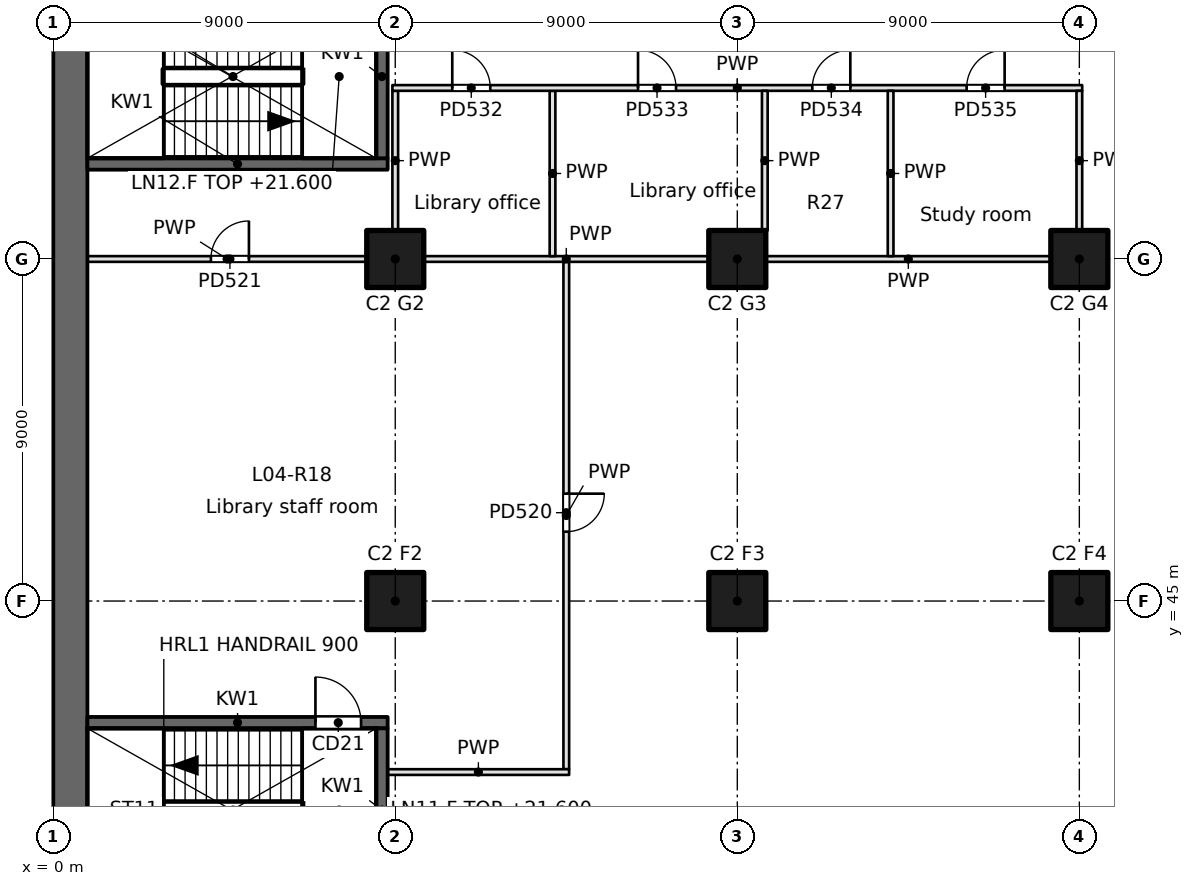
"""IFC4 building model, lengths in metres.
Left out: names, types, materials, properties, quantities, classifications, styles, units other than length and angle.
Written with IfcOpenShell. Run it as: python <this file> out.ifc"""

import sys

from ifc_helpers import new_model, si_unit, direction, frame, frame_2d, origin, origin_2d, place, context, subcontext, project, spatial, rectangle, extrude, element, fill, save


model = new_model("IFC4")
c1 = context("Model", 3, precision=1e-05, world=origin(), true_north=direction((0.0, 1.0)))
c2 = subcontext(c1, "Body", "Model", "MODEL_VIEW")
j1 = project(units=[si_unit("LENGTHUNIT", "METRE"), si_unit("PLANEANGLEUNIT", "RADIAN")], contexts=[c1])
p1 = place(None, origin())
s1 = spatial("IfcSite", under=j1, at=p1, CompositionType="ELEMENT")
p2 = place(p1, origin())
s2 = spatial("IfcBuilding", under=s1, at=p2, CompositionType="ELEMENT")
p3 = place(p2, frame((0.0, 0.0, 21.6)))
s3 = spatial("IfcBuildingStorey", under=s2, at=p3, CompositionType="ELEMENT", Elevation=21.6)
for number, where, z_axis, x_axis in (
    (1, (9.0, 45.0, 0.0), (0.0, 0.0, 1.0), (1.0, 0.0, 0.0)),
    (2, (9.0, 54.0, 0.0), (0.0, 0.0, 1.0), (1.0, 0.0, 0.0)),
    (3, (18.0, 45.0, 0.0), (0.0, 0.0, 1.0), (1.0, 0.0, 0.0)),
    (4, (18.0, 54.0, 0.0), (0.0, 0.0, 1.0), (1.0, 0.0, 0.0)),
    (5, (27.0, 45.0, 0.0), (0.0, 0.0, 1.0), (1.0, 0.0, 0.0)),
    (6, (27.0, 54.0, 0.0), (0.0, 0.0, 1.0), (1.0, 0.0, 0.0)),
):
    element("IfcColumn", number, at=place(p3, frame(where, z_axis=z_axis, x_axis=x_axis)), inside=s3, PredefinedType="COLUMN", context=c2, shape_type="SweptSolid", body=[
        extrude(rectangle(XDim=1.5, YDim=1.5, at=origin_2d()), origin(), (0.0, 0.0, 1.0), 4.8),
    ])
p4 = place(p3, frame((0.45, 94.5, 0.0), z_axis=(0.0, 0.0, 1.0), x_axis=(0.0, -1.0, 0.0)))
e7 = element("IfcWall", 7, at=p4, inside=s3, PredefinedType="SHEAR", context=c2, shape_type="SweptSolid", body=[
    extrude(rectangle(XDim=66.085, YDim=0.9, at=frame_2d((33.042, 0.0))), origin(), (0.0, 0.0, 1.0), 4.8),
])
p5 = place(p3, frame((0.9, 41.8, -0.35), z_axis=(0.0, 0.0, 1.0), x_axis=(1.0, 0.0, 0.0)))
e8 = element("IfcWall", 8, at=p5, inside=s3, PredefinedType="SOLIDWALL", context=c2, shape_type="SweptSolid", body=[
    extrude(rectangle(XDim=7.9, YDim=0.3, at=frame_2d((3.95, 0.0))), origin(), (0.0, 0.0, 1.0), 4.8),
])
p6 = place(p5, frame((6.0, 0.0, 0.35)))
e9 = element("IfcOpeningElement", 9, at=p6, cuts=e8, PredefinedType="OPENING", context=c2, shape_type="SweptSolid", body=[
    extrude(rectangle(XDim=1.2, YDim=2.1, at=frame_2d((0.6, 1.05))), frame((0.0, 0.15, 0.0), z_axis=(0.0, -1.0, 0.0), x_axis=(1.0, 0.0, 0.0)), (0.0, 0.0, 1.0), 0.3),
])
p7 = place(p3, frame((0.9, 56.5, -0.35), z_axis=(0.0, 0.0, 1.0), x_axis=(1.0, 0.0, 0.0)))
e10 = element("IfcWall", 10, at=p7, inside=s3, PredefinedType="SOLIDWALL", context=c2, shape_type="SweptSolid", body=[
    extrude(rectangle(XDim=7.9, YDim=0.3, at=frame_2d((3.95, 0.0))), origin(), (0.0, 0.0, 1.0), 4.8),
])
p8 = place(p3, frame((8.65, 37.35, -0.35), z_axis=(0.0, 0.0, 1.0), x_axis=(0.0, 1.0, 0.0)))
e11 = element("IfcWall", 11, at=p8, inside=s3, PredefinedType="SOLIDWALL", context=c2, shape_type="SweptSolid", body=[
    extrude(rectangle(XDim=4.3, YDim=0.3, at=frame_2d((2.15, 0.0))), origin(), (0.0, 0.0, 1.0), 4.8),
])
p9 = place(p3, frame((8.65, 56.65, -0.35), z_axis=(0.0, 0.0, 1.0), x_axis=(0.0, 1.0, 0.0)))
e12 = element("IfcWall", 12, at=p9, inside=s3, PredefinedType="SOLIDWALL", context=c2, shape_type="SweptSolid", body=[
    extrude(rectangle(XDim=4.3, YDim=0.3, at=frame_2d((2.15, 0.0))), origin(), (0.0, 0.0, 1.0), 4.8),
])
p10 = place(p3, frame((0.9, 54.0, 0.0), z_axis=(0.0, 0.0, 1.0), x_axis=(1.0, 0.0, 0.0)))
e13 = element("IfcWall", 13, at=p10, inside=s3, PredefinedType="PARTITIONING", context=c2, shape_type="SweptSolid", body=[
    extrude(rectangle(XDim=7.35, YDim=0.15, at=frame_2d((3.675, 0.0))), origin(), (0.0, 0.0, 1.0), 4.45),
])
p11 = place(p10, frame((3.25, 0.0, 0.0)))
e14 = element("IfcOpeningElement", 14, at=p11, cuts=e13, PredefinedType="OPENING", context=c2, shape_type="SweptSolid", body=[
    extrude(rectangle(XDim=1.0, YDim=2.1, at=frame_2d((0.5, 1.05))), frame((0.0, 0.075, 0.0), z_axis=(0.0, -1.0, 0.0), x_axis=(1.0, 0.0, 0.0)), (0.0, 0.0, 1.0), 0.15),
])
for number, where, z_axis, x_axis in (
    (15, (9.75, 54.0, 0.0), (0.0, 0.0, 1.0), (1.0, 0.0, 0.0)),
    (16, (26.25, 54.0, 0.0), (0.0, 0.0, 1.0), (-1.0, 0.0, 0.0)),
):
    element("IfcWall", number, at=place(p3, frame(where, z_axis=z_axis, x_axis=x_axis)), inside=s3, PredefinedType="PARTITIONING", context=c2, shape_type="SweptSolid", body=[
        extrude(rectangle(XDim=7.5, YDim=0.15, at=frame_2d((3.75, 0.0))), origin(), (0.0, 0.0, 1.0), 4.45),
    ])
p12 = place(p3, frame((13.5, 53.925, 0.0), z_axis=(0.0, 0.0, 1.0), x_axis=(0.0, -1.0, 0.0)))
e17 = element("IfcWall", 17, at=p12, inside=s3, PredefinedType="PARTITIONING", context=c2, shape_type="SweptSolid", body=[
    extrude(rectangle(XDim=13.35, YDim=0.15, at=frame_2d((6.675, 0.0))), origin(), (0.0, 0.0, 1.0), 4.45),
])
p13 = place(p12, frame((6.1, 0.0, 0.0)))
e18 = element("IfcOpeningElement", 18, at=p13, cuts=e17, PredefinedType="OPENING", context=c2, shape_type="SweptSolid", body=[
    extrude(rectangle(XDim=1.0, YDim=2.1, at=frame_2d((0.5, 1.05))), frame((0.0, 0.075, 0.0), z_axis=(0.0, -1.0, 0.0), x_axis=(1.0, 0.0, 0.0)), (0.0, 0.0, 1.0), 0.15),
])
p14 = place(p3, frame((13.575, 40.5, 0.0), z_axis=(0.0, 0.0, 1.0), x_axis=(-1.0, 0.0, 0.0)))
e19 = element("IfcWall", 19, at=p14, inside=s3, PredefinedType="PARTITIONING", context=c2, shape_type="SweptSolid", body=[
    extrude(rectangle(XDim=4.775, YDim=0.15, at=frame_2d((2.387, 0.0))), origin(), (0.0, 0.0, 1.0), 4.45),
])
p15 = place(p3, frame((13.138, 54.075, 0.0), z_axis=(0.0, 0.0, 1.0), x_axis=(0.0, 1.0, 0.0)))
e20 = element("IfcWall", 20, at=p15, inside=s3, PredefinedType="PARTITIONING", context=c2, shape_type="SweptSolid", body=[
    extrude(rectangle(XDim=4.35, YDim=0.15, at=frame_2d((2.175, 0.0))), origin(), (0.0, 0.0, 1.0), 4.45),
])
p16 = place(p3, frame((9.0, 54.75, 0.0), z_axis=(0.0, 0.0, 1.0), x_axis=(0.0, 1.0, 0.0)))
e21 = element("IfcWall", 21, at=p16, inside=s3, PredefinedType="PARTITIONING", context=c2, shape_type="SweptSolid", body=[
    extrude(rectangle(XDim=3.675, YDim=0.15, at=frame_2d((1.837, 0.0))), origin(), (0.0, 0.0, 1.0), 4.45),
])
p17 = place(p3, frame((8.925, 58.5, 0.0), z_axis=(0.0, 0.0, 1.0), x_axis=(1.0, 0.0, 0.0)))
e22 = element("IfcWall", 22, at=p17, inside=s3, PredefinedType="PARTITIONING", context=c2, shape_type="SweptSolid", body=[
    extrude(rectangle(XDim=18.15, YDim=0.15, at=frame_2d((9.075, 0.0))), origin(), (0.0, 0.0, 1.0), 4.45),
])
p18 = place(p17, frame((1.575, 0.0, 0.0)))
e23 = element("IfcOpeningElement", 23, at=p18, cuts=e22, PredefinedType="OPENING", context=c2, shape_type="SweptSolid", body=[
    extrude(rectangle(XDim=1.0, YDim=2.1, at=frame_2d((0.5, 1.05))), frame((0.0, 0.075, 0.0), z_axis=(0.0, -1.0, 0.0), x_axis=(1.0, 0.0, 0.0)), (0.0, 0.0, 1.0), 0.15),
])
p19 = place(p17, frame((6.463, 0.0, 0.0)))
e24 = element("IfcOpeningElement", 24, at=p19, cuts=e22, PredefinedType="OPENING", context=c2, shape_type="SweptSolid", body=[
    extrude(rectangle(XDim=1.0, YDim=2.1, at=frame_2d((0.5, 1.05))), frame((0.0, 0.075, 0.0), z_axis=(0.0, -1.0, 0.0), x_axis=(1.0, 0.0, 0.0)), (0.0, 0.0, 1.0), 0.15),
])
p20 = place(p17, frame((11.049, 0.0, 0.0)))
e25 = element("IfcOpeningElement", 25, at=p20, cuts=e22, PredefinedType="OPENING", context=c2, shape_type="SweptSolid", body=[
    extrude(rectangle(XDim=1.0, YDim=2.1, at=frame_2d((0.5, 1.05))), frame((0.0, 0.075, 0.0), z_axis=(0.0, -1.0, 0.0), x_axis=(1.0, 0.0, 0.0)), (0.0, 0.0, 1.0), 0.15),
])
p21 = place(p17, frame((15.109, 0.0, 0.0)))
e26 = element("IfcOpeningElement", 26, at=p21, cuts=e22, PredefinedType="OPENING", context=c2, shape_type="SweptSolid", body=[
    extrude(rectangle(XDim=1.0, YDim=2.1, at=frame_2d((0.5, 1.05))), frame((0.0, 0.075, 0.0), z_axis=(0.0, -1.0, 0.0), x_axis=(1.0, 0.0, 0.0)), (0.0, 0.0, 1.0), 0.15),
])
p22 = place(p3, frame((18.724, 54.75, 0.0), z_axis=(0.0, 0.0, 1.0), x_axis=(0.0, 1.0, 0.0)))
e27 = element("IfcWall", 27, at=p22, inside=s3, PredefinedType="PARTITIONING", context=c2, shape_type="SweptSolid", body=[
    extrude(rectangle(XDim=3.675, YDim=0.15, at=frame_2d((1.837, 0.0))), origin(), (0.0, 0.0, 1.0), 4.45),
])
p23 = place(p3, frame((22.034, 54.075, 0.0), z_axis=(0.0, 0.0, 1.0), x_axis=(0.0, 1.0, 0.0)))
e28 = element("IfcWall", 28, at=p23, inside=s3, PredefinedType="PARTITIONING", context=c2, shape_type="SweptSolid", body=[
    extrude(rectangle(XDim=4.35, YDim=0.15, at=frame_2d((2.175, 0.0))), origin(), (0.0, 0.0, 1.0), 4.45),
])
p24 = place(p3, frame((27.0, 58.425, 0.0), z_axis=(0.0, 0.0, 1.0), x_axis=(0.0, -1.0, 0.0)))
e29 = element("IfcWall", 29, at=p24, inside=s3, PredefinedType="PARTITIONING", context=c2, shape_type="SweptSolid", body=[
    extrude(rectangle(XDim=3.675, YDim=0.15, at=frame_2d((1.837, 0.0))), origin(), (0.0, 0.0, 1.0), 4.45),
])
p25 = place(p6, origin())
e30 = element("IfcDoor", 30, at=p25, inside=s3, OperationType="SINGLE_SWING_LEFT", PredefinedType="DOOR", context=c2, shape_type="SweptSolid", body=[
    extrude(rectangle(XDim=1.2, YDim=2.1, at=frame_2d((0.6, 1.05))), frame((0.0, 0.025, 0.0), z_axis=(0.0, -1.0, 0.0), x_axis=(1.0, 0.0, 0.0)), (0.0, 0.0, 1.0), 0.05),
])
fill(e9, e30)
p26 = place(p13, origin())
e31 = element("IfcDoor", 31, at=p26, inside=s3, OperationType="SINGLE_SWING_LEFT", PredefinedType="DOOR", context=c2, shape_type="SweptSolid", body=[
    extrude(rectangle(XDim=1.0, YDim=2.1, at=frame_2d((0.5, 1.05))), frame((0.0, 0.025, 0.0), z_axis=(0.0, -1.0, 0.0), x_axis=(1.0, 0.0, 0.0)), (0.0, 0.0, 1.0), 0.05),
])
fill(e18, e31)
p27 = place(p11, origin())
e32 = element("IfcDoor", 32, at=p27, inside=s3, OperationType="SINGLE_SWING_RIGHT", PredefinedType="DOOR", context=c2, shape_type="SweptSolid", body=[
    extrude(rectangle(XDim=1.0, YDim=2.1, at=frame_2d((0.5, 1.05))), frame((0.0, 0.025, 0.0), z_axis=(0.0, -1.0, 0.0), x_axis=(1.0, 0.0, 0.0)), (0.0, 0.0, 1.0), 0.05),
])
fill(e14, e32)
p28 = place(p18, origin())
e33 = element("IfcDoor", 33, at=p28, inside=s3, OperationType="SINGLE_SWING_LEFT", PredefinedType="DOOR", context=c2, shape_type="SweptSolid", body=[
    extrude(rectangle(XDim=1.0, YDim=2.1, at=frame_2d((0.5, 1.05))), frame((0.0, 0.025, 0.0), z_axis=(0.0, -1.0, 0.0), x_axis=(1.0, 0.0, 0.0)), (0.0, 0.0, 1.0), 0.05),
])
fill(e23, e33)
p29 = place(p19, origin())
e34 = element("IfcDoor", 34, at=p29, inside=s3, OperationType="SINGLE_SWING_LEFT", PredefinedType="DOOR", context=c2, shape_type="SweptSolid", body=[
    extrude(rectangle(XDim=1.0, YDim=2.1, at=frame_2d((0.5, 1.05))), frame((0.0, 0.025, 0.0), z_axis=(0.0, -1.0, 0.0), x_axis=(1.0, 0.0, 0.0)), (0.0, 0.0, 1.0), 0.05),
])
fill(e24, e34)
p30 = place(p20, origin())
e35 = element("IfcDoor", 35, at=p30, inside=s3, OperationType="SINGLE_SWING_RIGHT", PredefinedType="DOOR", context=c2, shape_type="SweptSolid", body=[
    extrude(rectangle(XDim=1.0, YDim=2.1, at=frame_2d((0.5, 1.05))), frame((0.0, 0.025, 0.0), z_axis=(0.0, -1.0, 0.0), x_axis=(1.0, 0.0, 0.0)), (0.0, 0.0, 1.0), 0.05),
])
fill(e25, e35)
p31 = place(p21, origin())
e36 = element("IfcDoor", 36, at=p31, inside=s3, OperationType="SINGLE_SWING_RIGHT", PredefinedType="DOOR", context=c2, shape_type="SweptSolid", body=[
    extrude(rectangle(XDim=1.0, YDim=2.1, at=frame_2d((0.5, 1.05))), frame((0.0, 0.025, 0.0), z_axis=(0.0, -1.0, 0.0), x_axis=(1.0, 0.0, 0.0)), (0.0, 0.0, 1.0), 0.05),
])
fill(e26, e36)
save(model, sys.argv[1])
